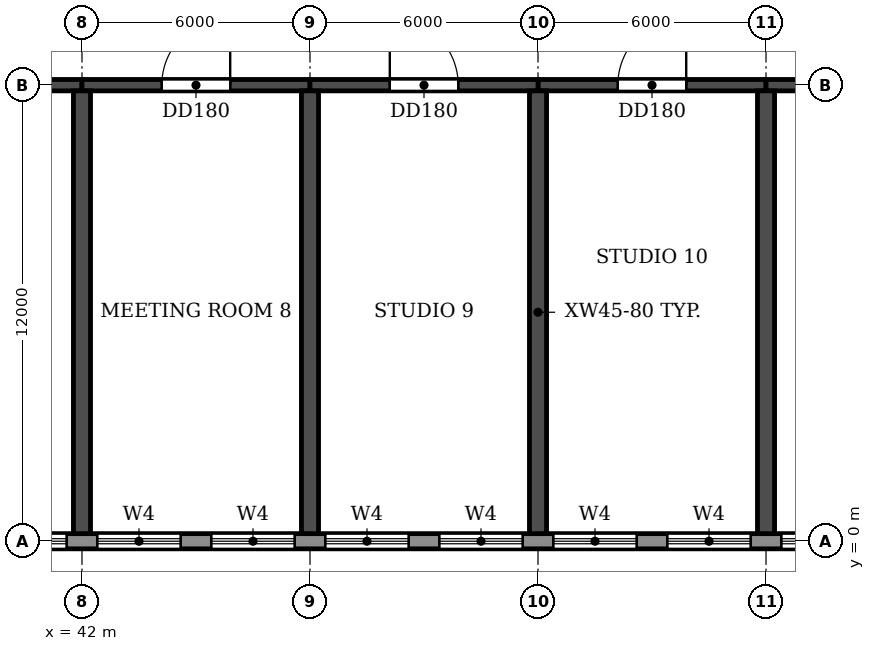
"""IFC4 building model, lengths in metres.
Left out: names, types, materials, properties, quantities, classifications, styles, units other than length and angle.
Written with IfcOpenShell. Run it as: python <this file> out.ifc"""

import sys

from ifc_helpers import new_model, si_unit, direction, frame, frame_2d, origin, place, context, subcontext, project, spatial, rectangle, extrude, element, fill, save


model = new_model("IFC4")
c1 = context("Model", 3, precision=1e-05, world=origin(), true_north=direction((0.0, 1.0)))
c2 = subcontext(c1, "Body", "Model", "MODEL_VIEW")
j1 = project(units=[si_unit("LENGTHUNIT", "METRE"), si_unit("PLANEANGLEUNIT", "RADIAN")], contexts=[c1])
p1 = place(None, origin())
s1 = spatial("IfcSite", under=j1, at=p1, CompositionType="ELEMENT")
p2 = place(p1, origin())
s2 = spatial("IfcBuilding", under=s1, at=p2, CompositionType="ELEMENT")
p3 = place(p2, frame((0.0, 0.0, 19.2)))
s3 = spatial("IfcBuildingStorey", under=s2, at=p3, CompositionType="ELEMENT", Elevation=19.2)
for number, where, z_axis, x_axis in (
    (1, (42.0, 0.2, 0.0), (0.0, 0.0, 1.0), (0.0, 1.0, 0.0)),
    (2, (48.0, 0.2, 0.0), (0.0, 0.0, 1.0), (0.0, 1.0, 0.0)),
    (3, (54.0, 0.2, 0.0), (0.0, 0.0, 1.0), (0.0, 1.0, 0.0)),
    (4, (60.0, 0.2, 0.0), (0.0, 0.0, 1.0), (0.0, 1.0, 0.0)),
):
    element("IfcWall", number, at=place(p3, frame(where, z_axis=z_axis, x_axis=x_axis)), inside=s3, PredefinedType="SHEAR", context=c2, shape_type="SweptSolid", body=[
        extrude(rectangle(XDim=11.65, YDim=0.45, at=frame_2d((5.825, 0.0))), origin(), (0.0, 0.0, 1.0), 3.95),
    ])
p4 = place(p3, frame((36.0, 12.0, 0.0), z_axis=(0.0, 0.0, 1.0), x_axis=(1.0, 0.0, 0.0)))
e5 = element("IfcWall", 5, at=p4, inside=s3, PredefinedType="SHEAR", context=c2, shape_type="SweptSolid", body=[
    extrude(rectangle(XDim=6.0, YDim=0.3, at=frame_2d((3.0, 0.0))), origin(), (0.0, 0.0, 1.0), 3.35),
])
p5 = place(p4, frame((2.1, 0.0, 0.0)))
e6 = element("IfcOpeningElement", 6, at=p5, cuts=e5, PredefinedType="OPENING", context=c2, shape_type="SweptSolid", body=[
    extrude(rectangle(XDim=1.8, YDim=2.1, at=frame_2d((0.9, 1.05))), frame((0.0, 0.16, 0.0), z_axis=(0.0, -1.0, 0.0), x_axis=(1.0, 0.0, 0.0)), (0.0, 0.0, 1.0), 0.32),
])
p6 = place(p3, frame((42.0, 12.0, 0.0), z_axis=(0.0, 0.0, 1.0), x_axis=(1.0, 0.0, 0.0)))
e7 = element("IfcWall", 7, at=p6, inside=s3, PredefinedType="SHEAR", context=c2, shape_type="SweptSolid", body=[
    extrude(rectangle(XDim=6.0, YDim=0.3, at=frame_2d((3.0, 0.0))), origin(), (0.0, 0.0, 1.0), 3.35),
])
p7 = place(p6, frame((2.1, 0.0, 0.0)))
e8 = element("IfcOpeningElement", 8, at=p7, cuts=e7, PredefinedType="OPENING", context=c2, shape_type="SweptSolid", body=[
    extrude(rectangle(XDim=1.8, YDim=2.1, at=frame_2d((0.9, 1.05))), frame((0.0, 0.16, 0.0), z_axis=(0.0, -1.0, 0.0), x_axis=(1.0, 0.0, 0.0)), (0.0, 0.0, 1.0), 0.32),
])
p8 = place(p3, frame((48.0, 12.0, 0.0), z_axis=(0.0, 0.0, 1.0), x_axis=(1.0, 0.0, 0.0)))
e9 = element("IfcWall", 9, at=p8, inside=s3, PredefinedType="SHEAR", context=c2, shape_type="SweptSolid", body=[
    extrude(rectangle(XDim=6.0, YDim=0.3, at=frame_2d((3.0, 0.0))), origin(), (0.0, 0.0, 1.0), 3.35),
])
p9 = place(p8, frame((2.1, 0.0, 0.0)))
e10 = element("IfcOpeningElement", 10, at=p9, cuts=e9, PredefinedType="OPENING", context=c2, shape_type="SweptSolid", body=[
    extrude(rectangle(XDim=1.8, YDim=2.1, at=frame_2d((0.9, 1.05))), frame((0.0, 0.16, 0.0), z_axis=(0.0, -1.0, 0.0), x_axis=(1.0, 0.0, 0.0)), (0.0, 0.0, 1.0), 0.32),
])
p10 = place(p3, frame((54.0, 12.0, 0.0), z_axis=(0.0, 0.0, 1.0), x_axis=(1.0, 0.0, 0.0)))
e11 = element("IfcWall", 11, at=p10, inside=s3, PredefinedType="SHEAR", context=c2, shape_type="SweptSolid", body=[
    extrude(rectangle(XDim=6.0, YDim=0.3, at=frame_2d((3.0, 0.0))), origin(), (0.0, 0.0, 1.0), 3.35),
])
p11 = place(p10, frame((2.1, 0.0, 0.0)))
e12 = element("IfcOpeningElement", 12, at=p11, cuts=e11, PredefinedType="OPENING", context=c2, shape_type="SweptSolid", body=[
    extrude(rectangle(XDim=1.8, YDim=2.1, at=frame_2d((0.9, 1.05))), frame((0.0, 0.16, 0.0), z_axis=(0.0, -1.0, 0.0), x_axis=(1.0, 0.0, 0.0)), (0.0, 0.0, 1.0), 0.32),
])
p12 = place(p3, frame((60.0, 12.0, 0.0), z_axis=(0.0, 0.0, 1.0), x_axis=(1.0, 0.0, 0.0)))
e13 = element("IfcWall", 13, at=p12, inside=s3, PredefinedType="SHEAR", context=c2, shape_type="SweptSolid", body=[
    extrude(rectangle(XDim=6.0, YDim=0.3, at=frame_2d((3.0, 0.0))), origin(), (0.0, 0.0, 1.0), 3.35),
])
p13 = place(p12, frame((2.1, 0.0, 0.0)))
e14 = element("IfcOpeningElement", 14, at=p13, cuts=e13, PredefinedType="OPENING", context=c2, shape_type="SweptSolid", body=[
    extrude(rectangle(XDim=1.8, YDim=2.1, at=frame_2d((0.9, 1.05))), frame((0.0, 0.16, 0.0), z_axis=(0.0, -1.0, 0.0), x_axis=(1.0, 0.0, 0.0)), (0.0, 0.0, 1.0), 0.32),
])
p14 = place(p3, frame((-3.0, 0.0, 0.0), z_axis=(0.0, 0.0, 1.0), x_axis=(1.0, 0.0, 0.0)))
e15 = element("IfcWall", 15, at=p14, inside=s3, PredefinedType="STANDARD", context=c2, shape_type="SweptSolid", body=[
    extrude(rectangle(XDim=108.0, YDim=0.4, at=frame_2d((54.0, 0.0))), origin(), (0.0, 0.0, 1.0), 3.95),
])
p15 = place(p14, frame((3.4, 0.0, 0.9)))
e16 = element("IfcOpeningElement", 16, at=p15, cuts=e15, PredefinedType="OPENING", context=c2, shape_type="SweptSolid", body=[
    extrude(rectangle(XDim=2.2, YDim=2.7, at=frame_2d((1.1, 1.35))), frame((0.0, 0.21, 0.0), z_axis=(0.0, -1.0, 0.0), x_axis=(1.0, 0.0, 0.0)), (0.0, 0.0, 1.0), 0.42),
])
p16 = place(p14, frame((6.4, 0.0, 0.9)))
e17 = element("IfcOpeningElement", 17, at=p16, cuts=e15, PredefinedType="OPENING", context=c2, shape_type="SweptSolid", body=[
    extrude(rectangle(XDim=2.2, YDim=2.7, at=frame_2d((1.1, 1.35))), frame((0.0, 0.21, 0.0), z_axis=(0.0, -1.0, 0.0), x_axis=(1.0, 0.0, 0.0)), (0.0, 0.0, 1.0), 0.42),
])
p17 = place(p14, frame((9.4, 0.0, 0.9)))
e18 = element("IfcOpeningElement", 18, at=p17, cuts=e15, PredefinedType="OPENING", context=c2, shape_type="SweptSolid", body=[
    extrude(rectangle(XDim=2.2, YDim=2.7, at=frame_2d((1.1, 1.35))), frame((0.0, 0.21, 0.0), z_axis=(0.0, -1.0, 0.0), x_axis=(1.0, 0.0, 0.0)), (0.0, 0.0, 1.0), 0.42),
])
p18 = place(p14, frame((12.4, 0.0, 0.9)))
e19 = element("IfcOpeningElement", 19, at=p18, cuts=e15, PredefinedType="OPENING", context=c2, shape_type="SweptSolid", body=[
    extrude(rectangle(XDim=2.2, YDim=2.7, at=frame_2d((1.1, 1.35))), frame((0.0, 0.21, 0.0), z_axis=(0.0, -1.0, 0.0), x_axis=(1.0, 0.0, 0.0)), (0.0, 0.0, 1.0), 0.42),
])
p19 = place(p14, frame((15.4, 0.0, 0.9)))
e20 = element("IfcOpeningElement", 20, at=p19, cuts=e15, PredefinedType="OPENING", context=c2, shape_type="SweptSolid", body=[
    extrude(rectangle(XDim=2.2, YDim=2.7, at=frame_2d((1.1, 1.35))), frame((0.0, 0.21, 0.0), z_axis=(0.0, -1.0, 0.0), x_axis=(1.0, 0.0, 0.0)), (0.0, 0.0, 1.0), 0.42),
])
p20 = place(p14, frame((18.4, 0.0, 0.9)))
e21 = element("IfcOpeningElement", 21, at=p20, cuts=e15, PredefinedType="OPENING", context=c2, shape_type="SweptSolid", body=[
    extrude(rectangle(XDim=2.2, YDim=2.7, at=frame_2d((1.1, 1.35))), frame((0.0, 0.21, 0.0), z_axis=(0.0, -1.0, 0.0), x_axis=(1.0, 0.0, 0.0)), (0.0, 0.0, 1.0), 0.42),
])
p21 = place(p14, frame((21.4, 0.0, 0.9)))
e22 = element("IfcOpeningElement", 22, at=p21, cuts=e15, PredefinedType="OPENING", context=c2, shape_type="SweptSolid", body=[
    extrude(rectangle(XDim=2.2, YDim=2.7, at=frame_2d((1.1, 1.35))), frame((0.0, 0.21, 0.0), z_axis=(0.0, -1.0, 0.0), x_axis=(1.0, 0.0, 0.0)), (0.0, 0.0, 1.0), 0.42),
])
p22 = place(p14, frame((24.4, 0.0, 0.9)))
e23 = element("IfcOpeningElement", 23, at=p22, cuts=e15, PredefinedType="OPENING", context=c2, shape_type="SweptSolid", body=[
    extrude(rectangle(XDim=2.2, YDim=2.7, at=frame_2d((1.1, 1.35))), frame((0.0, 0.21, 0.0), z_axis=(0.0, -1.0, 0.0), x_axis=(1.0, 0.0, 0.0)), (0.0, 0.0, 1.0), 0.42),
])
p23 = place(p14, frame((27.4, 0.0, 0.9)))
e24 = element("IfcOpeningElement", 24, at=p23, cuts=e15, PredefinedType="OPENING", context=c2, shape_type="SweptSolid", body=[
    extrude(rectangle(XDim=2.2, YDim=2.7, at=frame_2d((1.1, 1.35))), frame((0.0, 0.21, 0.0), z_axis=(0.0, -1.0, 0.0), x_axis=(1.0, 0.0, 0.0)), (0.0, 0.0, 1.0), 0.42),
])
p24 = place(p14, frame((30.4, 0.0, 0.9)))
e25 = element("IfcOpeningElement", 25, at=p24, cuts=e15, PredefinedType="OPENING", context=c2, shape_type="SweptSolid", body=[
    extrude(rectangle(XDim=2.2, YDim=2.7, at=frame_2d((1.1, 1.35))), frame((0.0, 0.21, 0.0), z_axis=(0.0, -1.0, 0.0), x_axis=(1.0, 0.0, 0.0)), (0.0, 0.0, 1.0), 0.42),
])
p25 = place(p14, frame((33.4, 0.0, 0.9)))
e26 = element("IfcOpeningElement", 26, at=p25, cuts=e15, PredefinedType="OPENING", context=c2, shape_type="SweptSolid", body=[
    extrude(rectangle(XDim=2.2, YDim=2.7, at=frame_2d((1.1, 1.35))), frame((0.0, 0.21, 0.0), z_axis=(0.0, -1.0, 0.0), x_axis=(1.0, 0.0, 0.0)), (0.0, 0.0, 1.0), 0.42),
])
p26 = place(p14, frame((36.4, 0.0, 0.9)))
e27 = element("IfcOpeningElement", 27, at=p26, cuts=e15, PredefinedType="OPENING", context=c2, shape_type="SweptSolid", body=[
    extrude(rectangle(XDim=2.2, YDim=2.7, at=frame_2d((1.1, 1.35))), frame((0.0, 0.21, 0.0), z_axis=(0.0, -1.0, 0.0), x_axis=(1.0, 0.0, 0.0)), (0.0, 0.0, 1.0), 0.42),
])
p27 = place(p14, frame((39.4, 0.0, 0.9)))
e28 = element("IfcOpeningElement", 28, at=p27, cuts=e15, PredefinedType="OPENING", context=c2, shape_type="SweptSolid", body=[
    extrude(rectangle(XDim=2.2, YDim=2.7, at=frame_2d((1.1, 1.35))), frame((0.0, 0.21, 0.0), z_axis=(0.0, -1.0, 0.0), x_axis=(1.0, 0.0, 0.0)), (0.0, 0.0, 1.0), 0.42),
])
p28 = place(p14, frame((42.4, 0.0, 0.9)))
e29 = element("IfcOpeningElement", 29, at=p28, cuts=e15, PredefinedType="OPENING", context=c2, shape_type="SweptSolid", body=[
    extrude(rectangle(XDim=2.2, YDim=2.7, at=frame_2d((1.1, 1.35))), frame((0.0, 0.21, 0.0), z_axis=(0.0, -1.0, 0.0), x_axis=(1.0, 0.0, 0.0)), (0.0, 0.0, 1.0), 0.42),
])
p29 = place(p14, frame((45.4, 0.0, 0.9)))
e30 = element("IfcOpeningElement", 30, at=p29, cuts=e15, PredefinedType="OPENING", context=c2, shape_type="SweptSolid", body=[
    extrude(rectangle(XDim=2.2, YDim=2.7, at=frame_2d((1.1, 1.35))), frame((0.0, 0.21, 0.0), z_axis=(0.0, -1.0, 0.0), x_axis=(1.0, 0.0, 0.0)), (0.0, 0.0, 1.0), 0.42),
])
p30 = place(p14, frame((48.4, 0.0, 0.9)))
e31 = element("IfcOpeningElement", 31, at=p30, cuts=e15, PredefinedType="OPENING", context=c2, shape_type="SweptSolid", body=[
    extrude(rectangle(XDim=2.2, YDim=2.7, at=frame_2d((1.1, 1.35))), frame((0.0, 0.21, 0.0), z_axis=(0.0, -1.0, 0.0), x_axis=(1.0, 0.0, 0.0)), (0.0, 0.0, 1.0), 0.42),
])
p31 = place(p14, frame((51.4, 0.0, 0.9)))
e32 = element("IfcOpeningElement", 32, at=p31, cuts=e15, PredefinedType="OPENING", context=c2, shape_type="SweptSolid", body=[
    extrude(rectangle(XDim=2.2, YDim=2.7, at=frame_2d((1.1, 1.35))), frame((0.0, 0.21, 0.0), z_axis=(0.0, -1.0, 0.0), x_axis=(1.0, 0.0, 0.0)), (0.0, 0.0, 1.0), 0.42),
])
p32 = place(p14, frame((54.4, 0.0, 0.9)))
e33 = element("IfcOpeningElement", 33, at=p32, cuts=e15, PredefinedType="OPENING", context=c2, shape_type="SweptSolid", body=[
    extrude(rectangle(XDim=2.2, YDim=2.7, at=frame_2d((1.1, 1.35))), frame((0.0, 0.21, 0.0), z_axis=(0.0, -1.0, 0.0), x_axis=(1.0, 0.0, 0.0)), (0.0, 0.0, 1.0), 0.42),
])
p33 = place(p14, frame((57.4, 0.0, 0.9)))
e34 = element("IfcOpeningElement", 34, at=p33, cuts=e15, PredefinedType="OPENING", context=c2, shape_type="SweptSolid", body=[
    extrude(rectangle(XDim=2.2, YDim=2.7, at=frame_2d((1.1, 1.35))), frame((0.0, 0.21, 0.0), z_axis=(0.0, -1.0, 0.0), x_axis=(1.0, 0.0, 0.0)), (0.0, 0.0, 1.0), 0.42),
])
p34 = place(p14, frame((60.4, 0.0, 0.9)))
e35 = element("IfcOpeningElement", 35, at=p34, cuts=e15, PredefinedType="OPENING", context=c2, shape_type="SweptSolid", body=[
    extrude(rectangle(XDim=2.2, YDim=2.7, at=frame_2d((1.1, 1.35))), frame((0.0, 0.21, 0.0), z_axis=(0.0, -1.0, 0.0), x_axis=(1.0, 0.0, 0.0)), (0.0, 0.0, 1.0), 0.42),
])
p35 = place(p14, frame((63.4, 0.0, 0.9)))
e36 = element("IfcOpeningElement", 36, at=p35, cuts=e15, PredefinedType="OPENING", context=c2, shape_type="SweptSolid", body=[
    extrude(rectangle(XDim=2.2, YDim=2.7, at=frame_2d((1.1, 1.35))), frame((0.0, 0.21, 0.0), z_axis=(0.0, -1.0, 0.0), x_axis=(1.0, 0.0, 0.0)), (0.0, 0.0, 1.0), 0.42),
])
p36 = place(p14, frame((66.4, 0.0, 0.9)))
e37 = element("IfcOpeningElement", 37, at=p36, cuts=e15, PredefinedType="OPENING", context=c2, shape_type="SweptSolid", body=[
    extrude(rectangle(XDim=2.2, YDim=2.7, at=frame_2d((1.1, 1.35))), frame((0.0, 0.21, 0.0), z_axis=(0.0, -1.0, 0.0), x_axis=(1.0, 0.0, 0.0)), (0.0, 0.0, 1.0), 0.42),
])
p37 = place(p14, frame((69.4, 0.0, 0.9)))
e38 = element("IfcOpeningElement", 38, at=p37, cuts=e15, PredefinedType="OPENING", context=c2, shape_type="SweptSolid", body=[
    extrude(rectangle(XDim=2.2, YDim=2.7, at=frame_2d((1.1, 1.35))), frame((0.0, 0.21, 0.0), z_axis=(0.0, -1.0, 0.0), x_axis=(1.0, 0.0, 0.0)), (0.0, 0.0, 1.0), 0.42),
])
p38 = place(p14, frame((72.4, 0.0, 0.9)))
e39 = element("IfcOpeningElement", 39, at=p38, cuts=e15, PredefinedType="OPENING", context=c2, shape_type="SweptSolid", body=[
    extrude(rectangle(XDim=2.2, YDim=2.7, at=frame_2d((1.1, 1.35))), frame((0.0, 0.21, 0.0), z_axis=(0.0, -1.0, 0.0), x_axis=(1.0, 0.0, 0.0)), (0.0, 0.0, 1.0), 0.42),
])
p39 = place(p14, frame((75.4, 0.0, 0.9)))
e40 = element("IfcOpeningElement", 40, at=p39, cuts=e15, PredefinedType="OPENING", context=c2, shape_type="SweptSolid", body=[
    extrude(rectangle(XDim=2.2, YDim=2.7, at=frame_2d((1.1, 1.35))), frame((0.0, 0.21, 0.0), z_axis=(0.0, -1.0, 0.0), x_axis=(1.0, 0.0, 0.0)), (0.0, 0.0, 1.0), 0.42),
])
p40 = place(p14, frame((78.4, 0.0, 0.9)))
e41 = element("IfcOpeningElement", 41, at=p40, cuts=e15, PredefinedType="OPENING", context=c2, shape_type="SweptSolid", body=[
    extrude(rectangle(XDim=2.2, YDim=2.7, at=frame_2d((1.1, 1.35))), frame((0.0, 0.21, 0.0), z_axis=(0.0, -1.0, 0.0), x_axis=(1.0, 0.0, 0.0)), (0.0, 0.0, 1.0), 0.42),
])
p41 = place(p14, frame((81.4, 0.0, 0.9)))
e42 = element("IfcOpeningElement", 42, at=p41, cuts=e15, PredefinedType="OPENING", context=c2, shape_type="SweptSolid", body=[
    extrude(rectangle(XDim=2.2, YDim=2.7, at=frame_2d((1.1, 1.35))), frame((0.0, 0.21, 0.0), z_axis=(0.0, -1.0, 0.0), x_axis=(1.0, 0.0, 0.0)), (0.0, 0.0, 1.0), 0.42),
])
p42 = place(p14, frame((84.4, 0.0, 0.9)))
e43 = element("IfcOpeningElement", 43, at=p42, cuts=e15, PredefinedType="OPENING", context=c2, shape_type="SweptSolid", body=[
    extrude(rectangle(XDim=2.2, YDim=2.7, at=frame_2d((1.1, 1.35))), frame((0.0, 0.21, 0.0), z_axis=(0.0, -1.0, 0.0), x_axis=(1.0, 0.0, 0.0)), (0.0, 0.0, 1.0), 0.42),
])
p43 = place(p14, frame((87.4, 0.0, 0.9)))
e44 = element("IfcOpeningElement", 44, at=p43, cuts=e15, PredefinedType="OPENING", context=c2, shape_type="SweptSolid", body=[
    extrude(rectangle(XDim=2.2, YDim=2.7, at=frame_2d((1.1, 1.35))), frame((0.0, 0.21, 0.0), z_axis=(0.0, -1.0, 0.0), x_axis=(1.0, 0.0, 0.0)), (0.0, 0.0, 1.0), 0.42),
])
p44 = place(p14, frame((90.4, 0.0, 0.9)))
e45 = element("IfcOpeningElement", 45, at=p44, cuts=e15, PredefinedType="OPENING", context=c2, shape_type="SweptSolid", body=[
    extrude(rectangle(XDim=2.2, YDim=2.7, at=frame_2d((1.1, 1.35))), frame((0.0, 0.21, 0.0), z_axis=(0.0, -1.0, 0.0), x_axis=(1.0, 0.0, 0.0)), (0.0, 0.0, 1.0), 0.42),
])
p45 = place(p14, frame((93.4, 0.0, 0.9)))
e46 = element("IfcOpeningElement", 46, at=p45, cuts=e15, PredefinedType="OPENING", context=c2, shape_type="SweptSolid", body=[
    extrude(rectangle(XDim=2.2, YDim=2.7, at=frame_2d((1.1, 1.35))), frame((0.0, 0.21, 0.0), z_axis=(0.0, -1.0, 0.0), x_axis=(1.0, 0.0, 0.0)), (0.0, 0.0, 1.0), 0.42),
])
p46 = place(p14, frame((96.4, 0.0, 0.9)))
e47 = element("IfcOpeningElement", 47, at=p46, cuts=e15, PredefinedType="OPENING", context=c2, shape_type="SweptSolid", body=[
    extrude(rectangle(XDim=2.2, YDim=2.7, at=frame_2d((1.1, 1.35))), frame((0.0, 0.21, 0.0), z_axis=(0.0, -1.0, 0.0), x_axis=(1.0, 0.0, 0.0)), (0.0, 0.0, 1.0), 0.42),
])
p47 = place(p14, frame((99.4, 0.0, 0.9)))
e48 = element("IfcOpeningElement", 48, at=p47, cuts=e15, PredefinedType="OPENING", context=c2, shape_type="SweptSolid", body=[
    extrude(rectangle(XDim=2.2, YDim=2.7, at=frame_2d((1.1, 1.35))), frame((0.0, 0.21, 0.0), z_axis=(0.0, -1.0, 0.0), x_axis=(1.0, 0.0, 0.0)), (0.0, 0.0, 1.0), 0.42),
])
p48 = place(p14, frame((102.4, 0.0, 0.9)))
e49 = element("IfcOpeningElement", 49, at=p48, cuts=e15, PredefinedType="OPENING", context=c2, shape_type="SweptSolid", body=[
    extrude(rectangle(XDim=2.2, YDim=2.7, at=frame_2d((1.1, 1.35))), frame((0.0, 0.21, 0.0), z_axis=(0.0, -1.0, 0.0), x_axis=(1.0, 0.0, 0.0)), (0.0, 0.0, 1.0), 0.42),
])
p49 = place(p28, origin())
e50 = element("IfcWindow", 50, at=p49, inside=s3, PartitioningType="DOUBLE_PANEL_HORIZONTAL", PredefinedType="WINDOW", context=c2, shape_type="SweptSolid", body=[
    extrude(rectangle(XDim=2.2, YDim=2.7, at=frame_2d((1.1, 1.35))), frame((0.0, 0.03, 0.0), z_axis=(0.0, -1.0, 0.0), x_axis=(1.0, 0.0, 0.0)), (0.0, 0.0, 1.0), 0.06),
])
fill(e29, e50)
p50 = place(p29, origin())
e51 = element("IfcWindow", 51, at=p50, inside=s3, PartitioningType="DOUBLE_PANEL_HORIZONTAL", PredefinedType="WINDOW", context=c2, shape_type="SweptSolid", body=[
    extrude(rectangle(XDim=2.2, YDim=2.7, at=frame_2d((1.1, 1.35))), frame((0.0, 0.03, 0.0), z_axis=(0.0, -1.0, 0.0), x_axis=(1.0, 0.0, 0.0)), (0.0, 0.0, 1.0), 0.06),
])
fill(e30, e51)
p51 = place(p30, origin())
e52 = element("IfcWindow", 52, at=p51, inside=s3, PartitioningType="DOUBLE_PANEL_HORIZONTAL", PredefinedType="WINDOW", context=c2, shape_type="SweptSolid", body=[
    extrude(rectangle(XDim=2.2, YDim=2.7, at=frame_2d((1.1, 1.35))), frame((0.0, 0.03, 0.0), z_axis=(0.0, -1.0, 0.0), x_axis=(1.0, 0.0, 0.0)), (0.0, 0.0, 1.0), 0.06),
])
fill(e31, e52)
p52 = place(p31, origin())
e53 = element("IfcWindow", 53, at=p52, inside=s3, PartitioningType="DOUBLE_PANEL_HORIZONTAL", PredefinedType="WINDOW", context=c2, shape_type="SweptSolid", body=[
    extrude(rectangle(XDim=2.2, YDim=2.7, at=frame_2d((1.1, 1.35))), frame((0.0, 0.03, 0.0), z_axis=(0.0, -1.0, 0.0), x_axis=(1.0, 0.0, 0.0)), (0.0, 0.0, 1.0), 0.06),
])
fill(e32, e53)
p53 = place(p32, origin())
e54 = element("IfcWindow", 54, at=p53, inside=s3, PartitioningType="DOUBLE_PANEL_HORIZONTAL", PredefinedType="WINDOW", context=c2, shape_type="SweptSolid", body=[
    extrude(rectangle(XDim=2.2, YDim=2.7, at=frame_2d((1.1, 1.35))), frame((0.0, 0.03, 0.0), z_axis=(0.0, -1.0, 0.0), x_axis=(1.0, 0.0, 0.0)), (0.0, 0.0, 1.0), 0.06),
])
fill(e33, e54)
p54 = place(p33, origin())
e55 = element("IfcWindow", 55, at=p54, inside=s3, PartitioningType="DOUBLE_PANEL_HORIZONTAL", PredefinedType="WINDOW", context=c2, shape_type="SweptSolid", body=[
    extrude(rectangle(XDim=2.2, YDim=2.7, at=frame_2d((1.1, 1.35))), frame((0.0, 0.03, 0.0), z_axis=(0.0, -1.0, 0.0), x_axis=(1.0, 0.0, 0.0)), (0.0, 0.0, 1.0), 0.06),
])
fill(e34, e55)
p55 = place(p34, origin())
e56 = element("IfcWindow", 56, at=p55, inside=s3, PartitioningType="DOUBLE_PANEL_HORIZONTAL", PredefinedType="WINDOW", context=c2, shape_type="SweptSolid", body=[
    extrude(rectangle(XDim=2.2, YDim=2.7, at=frame_2d((1.1, 1.35))), frame((0.0, 0.03, 0.0), z_axis=(0.0, -1.0, 0.0), x_axis=(1.0, 0.0, 0.0)), (0.0, 0.0, 1.0), 0.06),
])
fill(e35, e56)
p56 = place(p35, origin())
e57 = element("IfcWindow", 57, at=p56, inside=s3, PartitioningType="DOUBLE_PANEL_HORIZONTAL", PredefinedType="WINDOW", context=c2, shape_type="SweptSolid", body=[
    extrude(rectangle(XDim=2.2, YDim=2.7, at=frame_2d((1.1, 1.35))), frame((0.0, 0.03, 0.0), z_axis=(0.0, -1.0, 0.0), x_axis=(1.0, 0.0, 0.0)), (0.0, 0.0, 1.0), 0.06),
])
fill(e36, e57)
p57 = place(p7, origin())
e58 = element("IfcDoor", 58, at=p57, inside=s3, OperationType="DOUBLE_DOOR_SINGLE_SWING", PredefinedType="DOOR", context=c2, shape_type="SweptSolid", body=[
    extrude(rectangle(XDim=1.8, YDim=2.1, at=frame_2d((0.9, 1.05))), frame((0.0, 0.025, 0.0), z_axis=(0.0, -1.0, 0.0), x_axis=(1.0, 0.0, 0.0)), (0.0, 0.0, 1.0), 0.05),
])
fill(e8, e58)
p58 = place(p9, origin())
e59 = element("IfcDoor", 59, at=p58, inside=s3, OperationType="DOUBLE_DOOR_SINGLE_SWING", PredefinedType="DOOR", context=c2, shape_type="SweptSolid", body=[
    extrude(rectangle(XDim=1.8, YDim=2.1, at=frame_2d((0.9, 1.05))), frame((0.0, 0.025, 0.0), z_axis=(0.0, -1.0, 0.0), x_axis=(1.0, 0.0, 0.0)), (0.0, 0.0, 1.0), 0.05),
])
fill(e10, e59)
p59 = place(p11, origin())
e60 = element("IfcDoor", 60, at=p59, inside=s3, OperationType="DOUBLE_DOOR_SINGLE_SWING", PredefinedType="DOOR", context=c2, shape_type="SweptSolid", body=[
    extrude(rectangle(XDim=1.8, YDim=2.1, at=frame_2d((0.9, 1.05))), frame((0.0, 0.025, 0.0), z_axis=(0.0, -1.0, 0.0), x_axis=(1.0, 0.0, 0.0)), (0.0, 0.0, 1.0), 0.05),
])
fill(e12, e60)
save(model, sys.argv[1])
